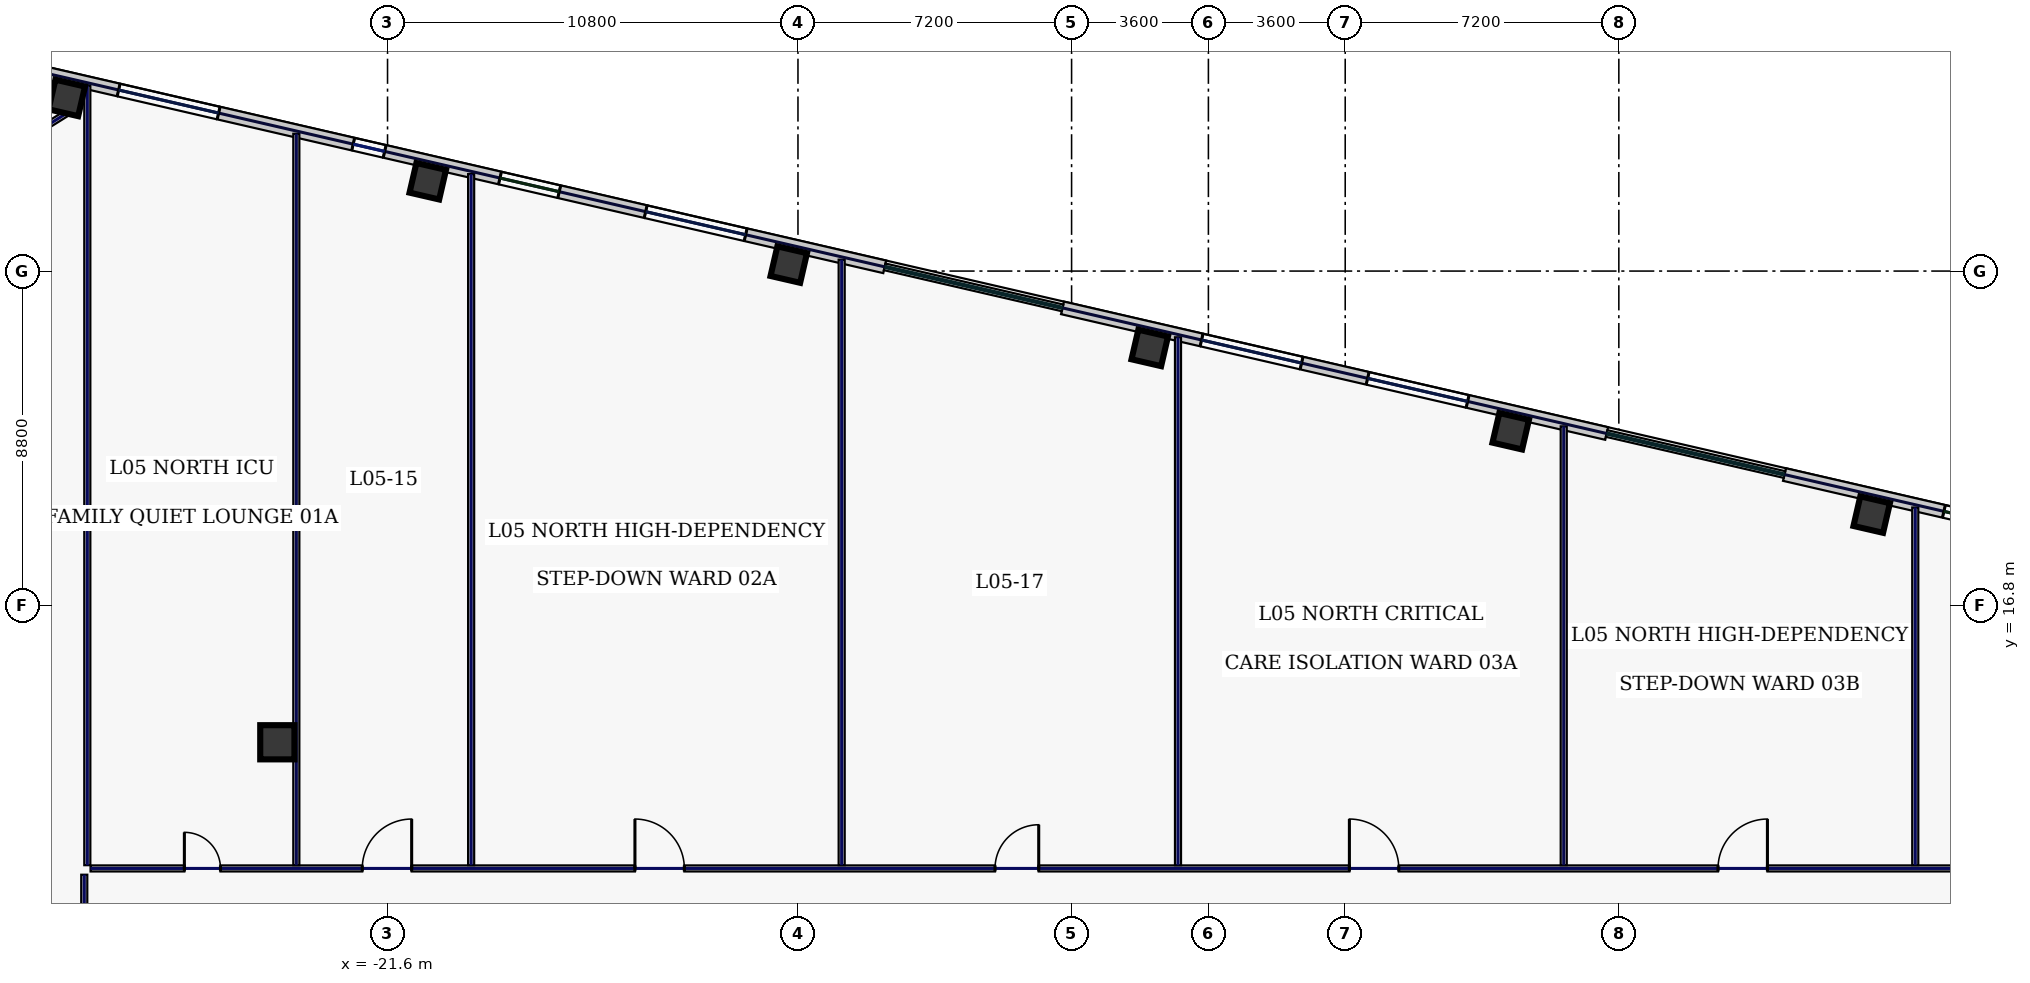
"""IFC4 building model, lengths in metres.
Left out: names, types, materials, properties, quantities, classifications, styles, units other than length and angle.
Written with IfcOpenShell. Run it as: python <this file> out.ifc"""

import sys

from ifc_helpers import new_model, si_unit, direction, frame, frame_2d, origin, origin_2d, place, context, subcontext, project, spatial, rectangle, hollow_rectangle, extrude, element, fill, save


model = new_model("IFC4")
c1 = context("Model", 3, precision=1e-05, world=origin(), true_north=direction((0.0, 1.0)))
c2 = subcontext(c1, "Body", "Model", "MODEL_VIEW")
j1 = project(units=[si_unit("LENGTHUNIT", "METRE"), si_unit("PLANEANGLEUNIT", "RADIAN")], contexts=[c1])
p1 = place(None, origin())
s1 = spatial("IfcSite", under=j1, at=p1, CompositionType="ELEMENT")
p2 = place(p1, origin())
s2 = spatial("IfcBuilding", under=s1, at=p2, CompositionType="ELEMENT")
p3 = place(p2, frame((0.0, 0.0, 28.4)))
s3 = spatial("IfcBuildingStorey", under=s2, at=p3, CompositionType="ELEMENT", Elevation=28.4)
p4 = place(p3, frame((-24.5, 13.2, 0.0), z_axis=(0.0, 0.0, 1.0), x_axis=(1.0, 0.0, 0.0)))
e1 = element("IfcColumn", 1, at=p4, inside=s3, PredefinedType="COLUMN", context=c2, shape_type="SweptSolid", body=[
    extrude(hollow_rectangle(XDim=0.9, YDim=0.9, WallThickness=0.04, at=origin_2d()), origin(), (0.0, 0.0, 1.0), 4.68),
])
for number, where, z_axis, x_axis in (
    (2, (17.454, 19.192, 0.0), (0.0, 0.0, 1.0), (0.974, -0.225, 0.0)),
    (3, (7.955, 21.385, 0.0), (0.0, 0.0, 1.0), (0.974, -0.225, 0.0)),
    (4, (-1.544, 23.578, 0.0), (0.0, 0.0, 1.0), (0.974, -0.225, 0.0)),
    (5, (-11.042, 25.771, 0.0), (0.0, 0.0, 1.0), (0.974, -0.225, 0.0)),
    (6, (-20.541, 27.964, 0.0), (0.0, 0.0, 1.0), (0.974, -0.225, 0.0)),
    (7, (-30.04, 30.156, 0.0), (0.0, 0.0, 1.0), (0.974, -0.225, 0.0)),
):
    element("IfcColumn", number, at=place(p3, frame(where, z_axis=z_axis, x_axis=x_axis)), inside=s3, PredefinedType="COLUMN", context=c2, shape_type="SweptSolid", body=[
        extrude(hollow_rectangle(XDim=0.8, YDim=0.8, WallThickness=0.036, at=origin_2d()), origin(), (0.0, 0.0, 1.0), 4.68),
    ])
p5 = place(p3, frame((37.229, 15.15, 0.0), z_axis=(0.0, 0.0, 1.0), x_axis=(-0.97436993772, 0.224951604723, 0.0)))
e8 = element("IfcWall", 8, at=p5, inside=s3, PredefinedType="STANDARD", context=c2, shape_type="SweptSolid", body=[
    extrude(rectangle(XDim=22.651, YDim=0.34, at=frame_2d((11.326, 0.0))), origin(), (0.0, 0.0, 1.0), 4.68),
])
p6 = place(p5, frame((16.745, 0.0, 0.22)))
e9 = element("IfcOpeningElement", 9, at=p6, cuts=e8, PredefinedType="OPENING", context=c2, shape_type="SweptSolid", body=[
    extrude(rectangle(XDim=1.6, YDim=1.2, at=frame_2d((0.8, 0.6))), frame((0.0, 0.18, 0.0), z_axis=(0.0, -1.0, 0.0), x_axis=(1.0, 0.0, 0.0)), (0.0, 0.0, 1.0), 0.36),
])
p7 = place(p5, frame((11.711, 0.0, 0.9)))
e10 = element("IfcOpeningElement", 10, at=p7, cuts=e8, PredefinedType="OPENING", context=c2, shape_type="SweptSolid", body=[
    extrude(rectangle(XDim=2.7, YDim=2.2, at=frame_2d((1.35, 1.1))), frame((0.0, 0.18, 0.0), z_axis=(0.0, -1.0, 0.0), x_axis=(1.0, 0.0, 0.0)), (0.0, 0.0, 1.0), 0.36),
])
p8 = place(p5, frame((6.447, 0.0, 0.9)))
e11 = element("IfcOpeningElement", 11, at=p8, cuts=e8, PredefinedType="OPENING", context=c2, shape_type="SweptSolid", body=[
    extrude(rectangle(XDim=0.85, YDim=1.85, at=frame_2d((0.425, 0.925))), frame((0.0, 0.18, 0.0), z_axis=(0.0, -1.0, 0.0), x_axis=(1.0, 0.0, 0.0)), (0.0, 0.0, 1.0), 0.36),
])
p9 = place(p5, frame((1.962, 0.0, 0.9)))
e12 = element("IfcOpeningElement", 12, at=p9, cuts=e8, PredefinedType="OPENING", context=c2, shape_type="SweptSolid", body=[
    extrude(rectangle(XDim=2.7, YDim=2.2, at=frame_2d((1.35, 1.1))), frame((0.0, 0.18, 0.0), z_axis=(0.0, -1.0, 0.0), x_axis=(1.0, 0.0, 0.0)), (0.0, 0.0, 1.0), 0.36),
])
p10 = place(p3, frame((10.481, 21.325, 0.0), z_axis=(0.0, 0.0, 1.0), x_axis=(-0.974369353393, 0.2249541357, 0.0)))
e13 = element("IfcWall", 13, at=p10, inside=s3, PredefinedType="STANDARD", context=c2, shape_type="SweptSolid", body=[
    extrude(rectangle(XDim=14.697, YDim=0.34, at=frame_2d((7.349, 0.0))), origin(), (0.0, 0.0, 1.0), 4.68),
])
p11 = place(p10, frame((8.241, 0.0, 0.9)))
e14 = element("IfcOpeningElement", 14, at=p11, cuts=e13, PredefinedType="OPENING", context=c2, shape_type="SweptSolid", body=[
    extrude(rectangle(XDim=2.7, YDim=2.2, at=frame_2d((1.35, 1.1))), frame((0.0, 0.18, 0.0), z_axis=(0.0, -1.0, 0.0), x_axis=(1.0, 0.0, 0.0)), (0.0, 0.0, 1.0), 0.36),
])
p12 = place(p10, frame((3.756, 0.0, 0.9)))
e15 = element("IfcOpeningElement", 15, at=p12, cuts=e13, PredefinedType="OPENING", context=c2, shape_type="SweptSolid", body=[
    extrude(rectangle(XDim=2.7, YDim=2.2, at=frame_2d((1.35, 1.1))), frame((0.0, 0.18, 0.0), z_axis=(0.0, -1.0, 0.0), x_axis=(1.0, 0.0, 0.0)), (0.0, 0.0, 1.0), 0.36),
])
p13 = place(p3, frame((-8.517, 25.711, 0.0), z_axis=(0.0, 0.0, 1.0), x_axis=(-0.974372845456, 0.224939009598, 0.0)))
e16 = element("IfcWall", 16, at=p13, inside=s3, PredefinedType="STANDARD", context=c2, shape_type="SweptSolid", body=[
    extrude(rectangle(XDim=22.652, YDim=0.34, at=frame_2d((11.326, 0.0))), origin(), (0.0, 0.0, 1.0), 4.68),
])
p14 = place(p13, frame((17.989, 0.0, 0.9)))
e17 = element("IfcOpeningElement", 17, at=p14, cuts=e16, PredefinedType="OPENING", context=c2, shape_type="SweptSolid", body=[
    extrude(rectangle(XDim=2.7, YDim=2.2, at=frame_2d((1.35, 1.1))), frame((0.0, 0.18, 0.0), z_axis=(0.0, -1.0, 0.0), x_axis=(1.0, 0.0, 0.0)), (0.0, 0.0, 1.0), 0.36),
])
p15 = place(p13, frame((13.505, 0.0, 0.9)))
e18 = element("IfcOpeningElement", 18, at=p15, cuts=e16, PredefinedType="OPENING", context=c2, shape_type="SweptSolid", body=[
    extrude(rectangle(XDim=0.85, YDim=1.85, at=frame_2d((0.425, 0.925))), frame((0.0, 0.18, 0.0), z_axis=(0.0, -1.0, 0.0), x_axis=(1.0, 0.0, 0.0)), (0.0, 0.0, 1.0), 0.36),
])
p16 = place(p13, frame((8.791, 0.0, 0.22)))
e19 = element("IfcOpeningElement", 19, at=p16, cuts=e16, PredefinedType="OPENING", context=c2, shape_type="SweptSolid", body=[
    extrude(rectangle(XDim=1.6, YDim=1.2, at=frame_2d((0.8, 0.6))), frame((0.0, 0.18, 0.0), z_axis=(0.0, -1.0, 0.0), x_axis=(1.0, 0.0, 0.0)), (0.0, 0.0, 1.0), 0.36),
])
p17 = place(p13, frame((3.756, 0.0, 0.9)))
e20 = element("IfcOpeningElement", 20, at=p17, cuts=e16, PredefinedType="OPENING", context=c2, shape_type="SweptSolid", body=[
    extrude(rectangle(XDim=2.7, YDim=2.2, at=frame_2d((1.35, 1.1))), frame((0.0, 0.18, 0.0), z_axis=(0.0, -1.0, 0.0), x_axis=(1.0, 0.0, 0.0)), (0.0, 0.0, 1.0), 0.36),
])
p18 = place(p3, frame((-29.86, 29.868, 0.0), z_axis=(0.0, 0.0, 1.0), x_axis=(-0.848043064089, -0.529927317139, 0.0)))
e21 = element("IfcWall", 21, at=p18, inside=s3, PredefinedType="PARTITIONING", context=c2, shape_type="SweptSolid", body=[
    extrude(rectangle(XDim=7.354, YDim=0.16, at=frame_2d((3.677, 0.0))), origin(), (0.0, 0.0, 1.0), 4.68),
])
p19 = place(p3, frame((-29.58, -9.715, 0.0), z_axis=(0.0, 0.0, 1.0), x_axis=(0.0, 1.0, 0.0)))
e22 = element("IfcWall", 22, at=p19, inside=s3, PredefinedType="PARTITIONING", context=c2, shape_type="SweptSolid", body=[
    extrude(rectangle(XDim=19.43, YDim=0.16, at=frame_2d((9.715, 0.0))), origin(), (0.0, 0.0, 1.0), 4.68),
])
p20 = place(p19, frame((2.019, 0.0, 0.0)))
e23 = element("IfcOpeningElement", 23, at=p20, cuts=e22, PredefinedType="OPENING", context=c2, shape_type="SweptSolid", body=[
    extrude(rectangle(XDim=0.95, YDim=2.2, at=frame_2d((0.475, 1.1))), frame((0.0, 0.09, 0.0), z_axis=(0.0, -1.0, 0.0), x_axis=(1.0, 0.0, 0.0)), (0.0, 0.0, 1.0), 0.18),
])
p21 = place(p19, frame((6.725, 0.0, 0.0)))
e24 = element("IfcOpeningElement", 24, at=p21, cuts=e22, PredefinedType="OPENING", context=c2, shape_type="SweptSolid", body=[
    extrude(rectangle(XDim=0.95, YDim=2.2, at=frame_2d((0.475, 1.1))), frame((0.0, 0.09, 0.0), z_axis=(0.0, -1.0, 0.0), x_axis=(1.0, 0.0, 0.0)), (0.0, 0.0, 1.0), 0.18),
])
p22 = place(p19, frame((11.925, 0.0, 0.0)))
e25 = element("IfcOpeningElement", 25, at=p22, cuts=e22, PredefinedType="OPENING", context=c2, shape_type="SweptSolid", body=[
    extrude(rectangle(XDim=0.95, YDim=2.2, at=frame_2d((0.475, 1.1))), frame((0.0, 0.09, 0.0), z_axis=(0.0, -1.0, 0.0), x_axis=(1.0, 0.0, 0.0)), (0.0, 0.0, 1.0), 0.18),
])
p23 = place(p19, frame((16.631, 0.0, 0.0)))
e26 = element("IfcOpeningElement", 26, at=p23, cuts=e22, PredefinedType="OPENING", context=c2, shape_type="SweptSolid", body=[
    extrude(rectangle(XDim=0.95, YDim=2.2, at=frame_2d((0.475, 1.1))), frame((0.0, 0.09, 0.0), z_axis=(0.0, -1.0, 0.0), x_axis=(1.0, 0.0, 0.0)), (0.0, 0.0, 1.0), 0.18),
])
p24 = place(p3, frame((-29.415, 9.88, 0.0), z_axis=(0.0, 0.0, 1.0), x_axis=(1.0, 0.0, 0.0)))
e27 = element("IfcWall", 27, at=p24, inside=s3, PredefinedType="PARTITIONING", context=c2, shape_type="SweptSolid", body=[
    extrude(rectangle(XDim=58.83, YDim=0.16, at=frame_2d((29.415, 0.0))), origin(), (0.0, 0.0, 1.0), 4.68),
])
p25 = place(p24, frame((2.469, 0.0, 0.0)))
e28 = element("IfcOpeningElement", 28, at=p25, cuts=e27, PredefinedType="OPENING", context=c2, shape_type="SweptSolid", body=[
    extrude(rectangle(XDim=0.95, YDim=2.2, at=frame_2d((0.475, 1.1))), frame((0.0, 0.09, 0.0), z_axis=(0.0, -1.0, 0.0), x_axis=(1.0, 0.0, 0.0)), (0.0, 0.0, 1.0), 0.18),
])
p26 = place(p24, frame((7.15, 0.0, 0.0)))
e29 = element("IfcOpeningElement", 29, at=p26, cuts=e27, PredefinedType="OPENING", context=c2, shape_type="SweptSolid", body=[
    extrude(rectangle(XDim=1.3, YDim=2.2, at=frame_2d((0.65, 1.1))), frame((0.0, 0.09, 0.0), z_axis=(0.0, -1.0, 0.0), x_axis=(1.0, 0.0, 0.0)), (0.0, 0.0, 1.0), 0.18),
])
p27 = place(p24, frame((14.325, 0.0, 0.0)))
e30 = element("IfcOpeningElement", 30, at=p27, cuts=e27, PredefinedType="OPENING", context=c2, shape_type="SweptSolid", body=[
    extrude(rectangle(XDim=1.3, YDim=2.2, at=frame_2d((0.65, 1.1))), frame((0.0, 0.09, 0.0), z_axis=(0.0, -1.0, 0.0), x_axis=(1.0, 0.0, 0.0)), (0.0, 0.0, 1.0), 0.18),
])
p28 = place(p24, frame((23.8, 0.0, 0.0)))
e31 = element("IfcOpeningElement", 31, at=p28, cuts=e27, PredefinedType="OPENING", context=c2, shape_type="SweptSolid", body=[
    extrude(rectangle(XDim=1.15, YDim=2.2, at=frame_2d((0.575, 1.1))), frame((0.0, 0.09, 0.0), z_axis=(0.0, -1.0, 0.0), x_axis=(1.0, 0.0, 0.0)), (0.0, 0.0, 1.0), 0.18),
])
p29 = place(p24, frame((33.125, 0.0, 0.0)))
e32 = element("IfcOpeningElement", 32, at=p29, cuts=e27, PredefinedType="OPENING", context=c2, shape_type="SweptSolid", body=[
    extrude(rectangle(XDim=1.3, YDim=2.2, at=frame_2d((0.65, 1.1))), frame((0.0, 0.09, 0.0), z_axis=(0.0, -1.0, 0.0), x_axis=(1.0, 0.0, 0.0)), (0.0, 0.0, 1.0), 0.18),
])
p30 = place(p24, frame((42.825, 0.0, 0.0)))
e33 = element("IfcOpeningElement", 33, at=p30, cuts=e27, PredefinedType="OPENING", context=c2, shape_type="SweptSolid", body=[
    extrude(rectangle(XDim=1.3, YDim=2.2, at=frame_2d((0.65, 1.1))), frame((0.0, 0.09, 0.0), z_axis=(0.0, -1.0, 0.0), x_axis=(1.0, 0.0, 0.0)), (0.0, 0.0, 1.0), 0.18),
])
p31 = place(p24, frame((52.706, 0.0, 0.0)))
e34 = element("IfcOpeningElement", 34, at=p31, cuts=e27, PredefinedType="OPENING", context=c2, shape_type="SweptSolid", body=[
    extrude(rectangle(XDim=1.45, YDim=2.2, at=frame_2d((0.725, 1.1))), frame((0.0, 0.09, 0.0), z_axis=(0.0, -1.0, 0.0), x_axis=(1.0, 0.0, 0.0)), (0.0, 0.0, 1.0), 0.18),
])
p32 = place(p3, frame((-29.5, 9.965, 0.0), z_axis=(0.0, 0.0, 1.0), x_axis=(0.0, 1.0, 0.0)))
e35 = element("IfcWall", 35, at=p32, inside=s3, PredefinedType="PARTITIONING", context=c2, shape_type="SweptSolid", body=[
    extrude(rectangle(XDim=20.519, YDim=0.16, at=frame_2d((10.259, 0.0))), origin(), (0.0, 0.0, 1.0), 4.68),
])
p33 = place(p3, frame((-19.4, 9.965, 0.0), z_axis=(0.0, 0.0, 1.0), x_axis=(0.0, 1.0, 0.0)))
e36 = element("IfcWall", 36, at=p33, inside=s3, PredefinedType="PARTITIONING", context=c2, shape_type="SweptSolid", body=[
    extrude(rectangle(XDim=18.187, YDim=0.16, at=frame_2d((9.093, 0.0))), origin(), (0.0, 0.0, 1.0), 4.68),
])
p34 = place(p3, frame((-0.8, 9.965, 0.0), z_axis=(0.0, 0.0, 1.0), x_axis=(0.0, 1.0, 0.0)))
e37 = element("IfcWall", 37, at=p34, inside=s3, PredefinedType="PARTITIONING", context=c2, shape_type="SweptSolid", body=[
    extrude(rectangle(XDim=13.893, YDim=0.16, at=frame_2d((6.946, 0.0))), origin(), (0.0, 0.0, 1.0), 4.68),
])
p35 = place(p3, frame((18.6, 9.965, 0.0), z_axis=(0.0, 0.0, 1.0), x_axis=(0.0, 1.0, 0.0)))
e38 = element("IfcWall", 38, at=p35, inside=s3, PredefinedType="PARTITIONING", context=c2, shape_type="SweptSolid", body=[
    extrude(rectangle(XDim=9.414, YDim=0.16, at=frame_2d((4.707, 0.0))), origin(), (0.0, 0.0, 1.0), 4.68),
])
p36 = place(p3, frame((-24.0, 9.965, 0.0), z_axis=(0.0, 0.0, 1.0), x_axis=(0.0, 1.0, 0.0)))
e39 = element("IfcWall", 39, at=p36, inside=s3, PredefinedType="PARTITIONING", context=c2, shape_type="SweptSolid", body=[
    extrude(rectangle(XDim=19.249, YDim=0.16, at=frame_2d((9.625, 0.0))), origin(), (0.0, 0.0, 1.0), 4.175),
])
p37 = place(p3, frame((-9.65, 9.965, 0.0), z_axis=(0.0, 0.0, 1.0), x_axis=(0.0, 1.0, 0.0)))
e40 = element("IfcWall", 40, at=p37, inside=s3, PredefinedType="PARTITIONING", context=c2, shape_type="SweptSolid", body=[
    extrude(rectangle(XDim=15.936, YDim=0.16, at=frame_2d((7.968, 0.0))), origin(), (0.0, 0.0, 1.0), 4.68),
])
p38 = place(p3, frame((9.35, 9.965, 0.0), z_axis=(0.0, 0.0, 1.0), x_axis=(0.0, 1.0, 0.0)))
e41 = element("IfcWall", 41, at=p38, inside=s3, PredefinedType="PARTITIONING", context=c2, shape_type="SweptSolid", body=[
    extrude(rectangle(XDim=11.549, YDim=0.16, at=frame_2d((5.775, 0.0))), origin(), (0.0, 0.0, 1.0), 4.175),
])
p39 = place(p6, origin())
e42 = element("IfcWindow", 42, at=p39, inside=s3, PartitioningType="SINGLE_PANEL", PredefinedType="WINDOW", context=c2, shape_type="SweptSolid", body=[
    extrude(rectangle(XDim=1.6, YDim=1.2, at=frame_2d((0.8, 0.6))), frame((0.0, 0.03, 0.0), z_axis=(0.0, -1.0, 0.0), x_axis=(1.0, 0.0, 0.0)), (0.0, 0.0, 1.0), 0.06),
])
fill(e9, e42)
p40 = place(p11, origin())
e43 = element("IfcWindow", 43, at=p40, inside=s3, PartitioningType="SINGLE_PANEL", PredefinedType="WINDOW", context=c2, shape_type="SweptSolid", body=[
    extrude(rectangle(XDim=2.7, YDim=2.2, at=frame_2d((1.35, 1.1))), frame((0.0, 0.03, 0.0), z_axis=(0.0, -1.0, 0.0), x_axis=(1.0, 0.0, 0.0)), (0.0, 0.0, 1.0), 0.06),
])
fill(e14, e43)
p41 = place(p12, origin())
e44 = element("IfcWindow", 44, at=p41, inside=s3, PartitioningType="SINGLE_PANEL", PredefinedType="WINDOW", context=c2, shape_type="SweptSolid", body=[
    extrude(rectangle(XDim=2.7, YDim=2.2, at=frame_2d((1.35, 1.1))), frame((0.0, 0.03, 0.0), z_axis=(0.0, -1.0, 0.0), x_axis=(1.0, 0.0, 0.0)), (0.0, 0.0, 1.0), 0.06),
])
fill(e15, e44)
p42 = place(p14, origin())
e45 = element("IfcWindow", 45, at=p42, inside=s3, PartitioningType="SINGLE_PANEL", PredefinedType="WINDOW", context=c2, shape_type="SweptSolid", body=[
    extrude(rectangle(XDim=2.7, YDim=2.2, at=frame_2d((1.35, 1.1))), frame((0.0, 0.03, 0.0), z_axis=(0.0, -1.0, 0.0), x_axis=(1.0, 0.0, 0.0)), (0.0, 0.0, 1.0), 0.06),
])
fill(e17, e45)
p43 = place(p15, origin())
e46 = element("IfcWindow", 46, at=p43, inside=s3, PartitioningType="SINGLE_PANEL", PredefinedType="WINDOW", context=c2, shape_type="SweptSolid", body=[
    extrude(rectangle(XDim=0.85, YDim=1.85, at=frame_2d((0.425, 0.925))), frame((0.0, 0.03, 0.0), z_axis=(0.0, -1.0, 0.0), x_axis=(1.0, 0.0, 0.0)), (0.0, 0.0, 1.0), 0.06),
])
fill(e18, e46)
p44 = place(p16, origin())
e47 = element("IfcWindow", 47, at=p44, inside=s3, PartitioningType="SINGLE_PANEL", PredefinedType="WINDOW", context=c2, shape_type="SweptSolid", body=[
    extrude(rectangle(XDim=1.6, YDim=1.2, at=frame_2d((0.8, 0.6))), frame((0.0, 0.03, 0.0), z_axis=(0.0, -1.0, 0.0), x_axis=(1.0, 0.0, 0.0)), (0.0, 0.0, 1.0), 0.06),
])
fill(e19, e47)
p45 = place(p17, origin())
e48 = element("IfcWindow", 48, at=p45, inside=s3, PartitioningType="SINGLE_PANEL", PredefinedType="WINDOW", context=c2, shape_type="SweptSolid", body=[
    extrude(rectangle(XDim=2.7, YDim=2.2, at=frame_2d((1.35, 1.1))), frame((0.0, 0.03, 0.0), z_axis=(0.0, -1.0, 0.0), x_axis=(1.0, 0.0, 0.0)), (0.0, 0.0, 1.0), 0.06),
])
fill(e20, e48)
p46 = place(p25, origin())
e49 = element("IfcDoor", 49, at=p46, inside=s3, OperationType="SINGLE_SWING_LEFT", PredefinedType="DOOR", context=c2, shape_type="SweptSolid", body=[
    extrude(rectangle(XDim=0.95, YDim=2.2, at=frame_2d((0.475, 1.1))), frame((0.0, 0.025, 0.0), z_axis=(0.0, -1.0, 0.0), x_axis=(1.0, 0.0, 0.0)), (0.0, 0.0, 1.0), 0.05),
])
fill(e28, e49)
p47 = place(p26, origin())
e50 = element("IfcDoor", 50, at=p47, inside=s3, OperationType="SINGLE_SWING_RIGHT", PredefinedType="DOOR", context=c2, shape_type="SweptSolid", body=[
    extrude(rectangle(XDim=1.3, YDim=2.2, at=frame_2d((0.65, 1.1))), frame((0.0, 0.025, 0.0), z_axis=(0.0, -1.0, 0.0), x_axis=(1.0, 0.0, 0.0)), (0.0, 0.0, 1.0), 0.05),
])
fill(e29, e50)
p48 = place(p27, origin())
e51 = element("IfcDoor", 51, at=p48, inside=s3, OperationType="SINGLE_SWING_LEFT", PredefinedType="DOOR", context=c2, shape_type="SweptSolid", body=[
    extrude(rectangle(XDim=1.3, YDim=2.2, at=frame_2d((0.65, 1.1))), frame((0.0, 0.025, 0.0), z_axis=(0.0, -1.0, 0.0), x_axis=(1.0, 0.0, 0.0)), (0.0, 0.0, 1.0), 0.05),
])
fill(e30, e51)
p49 = place(p28, origin())
e52 = element("IfcDoor", 52, at=p49, inside=s3, OperationType="SINGLE_SWING_RIGHT", PredefinedType="DOOR", context=c2, shape_type="SweptSolid", body=[
    extrude(rectangle(XDim=1.15, YDim=2.2, at=frame_2d((0.575, 1.1))), frame((0.0, 0.025, 0.0), z_axis=(0.0, -1.0, 0.0), x_axis=(1.0, 0.0, 0.0)), (0.0, 0.0, 1.0), 0.05),
])
fill(e31, e52)
p50 = place(p29, origin())
e53 = element("IfcDoor", 53, at=p50, inside=s3, OperationType="SINGLE_SWING_LEFT", PredefinedType="DOOR", context=c2, shape_type="SweptSolid", body=[
    extrude(rectangle(XDim=1.3, YDim=2.2, at=frame_2d((0.65, 1.1))), frame((0.0, 0.025, 0.0), z_axis=(0.0, -1.0, 0.0), x_axis=(1.0, 0.0, 0.0)), (0.0, 0.0, 1.0), 0.05),
])
fill(e32, e53)
p51 = place(p30, origin())
e54 = element("IfcDoor", 54, at=p51, inside=s3, OperationType="SINGLE_SWING_RIGHT", PredefinedType="DOOR", context=c2, shape_type="SweptSolid", body=[
    extrude(rectangle(XDim=1.3, YDim=2.2, at=frame_2d((0.65, 1.1))), frame((0.0, 0.025, 0.0), z_axis=(0.0, -1.0, 0.0), x_axis=(1.0, 0.0, 0.0)), (0.0, 0.0, 1.0), 0.05),
])
fill(e33, e54)
save(model, sys.argv[1])
